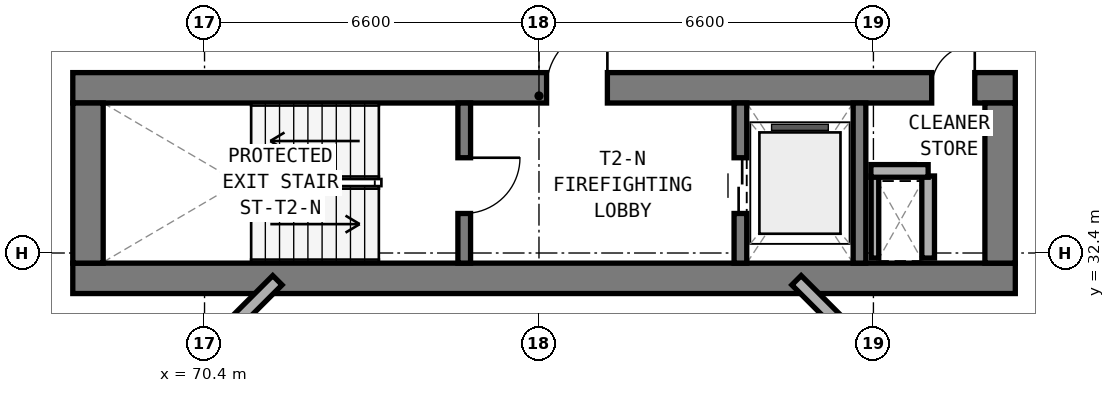
"""IFC4 building model, lengths in metres.
Left out: names, types, materials, properties, quantities, classifications, styles, units other than length and angle.
Written with IfcOpenShell. Run it as: python <this file> out.ifc"""

import sys

from ifc_helpers import new_model, si_unit, direction, frame, frame_2d, origin, place, context, subcontext, project, spatial, rectangle, extrude, element, fill, save


model = new_model("IFC4")
c1 = context("Model", 3, precision=1e-05, world=origin(), true_north=direction((0.0, 1.0)))
c2 = subcontext(c1, "Body", "Model", "MODEL_VIEW")
j1 = project(units=[si_unit("LENGTHUNIT", "METRE"), si_unit("PLANEANGLEUNIT", "RADIAN")], contexts=[c1])
p1 = place(None, origin())
s1 = spatial("IfcSite", under=j1, at=p1, CompositionType="ELEMENT")
p2 = place(p1, origin())
s2 = spatial("IfcBuilding", under=s1, at=p2, CompositionType="ELEMENT")
p3 = place(p2, frame((0.0, 0.0, 27.5)))
s3 = spatial("IfcBuildingStorey", under=s2, at=p3, CompositionType="ELEMENT", Elevation=27.5)
p4 = place(p3, frame((67.8, 31.9, 0.0), z_axis=(0.0, 0.0, 1.0), x_axis=(1.0, 0.0, 0.0)))
e1 = element("IfcWall", 1, at=p4, inside=s3, PredefinedType="SHEAR", context=c2, shape_type="SweptSolid", body=[
    extrude(rectangle(XDim=18.6, YDim=0.6, at=frame_2d((9.3, 0.0))), origin(), (0.0, 0.0, 1.0), 3.5),
])
p5 = place(p3, frame((67.8, 35.66, 0.0), z_axis=(0.0, 0.0, 1.0), x_axis=(1.0, 0.0, 0.0)))
e2 = element("IfcWall", 2, at=p5, inside=s3, PredefinedType="SHEAR", context=c2, shape_type="SweptSolid", body=[
    extrude(rectangle(XDim=18.6, YDim=0.6, at=frame_2d((9.3, 0.0))), origin(), (0.0, 0.0, 1.0), 3.5),
])
p6 = place(p5, frame((9.35, 0.0, 0.0)))
e3 = element("IfcOpeningElement", 3, at=p6, cuts=e2, PredefinedType="OPENING", context=c2, shape_type="SweptSolid", body=[
    extrude(rectangle(XDim=1.2, YDim=2.15, at=frame_2d((0.6, 1.075))), frame((0.0, 0.31, 0.0), z_axis=(0.0, -1.0, 0.0), x_axis=(1.0, 0.0, 0.0)), (0.0, 0.0, 1.0), 0.62),
])
p7 = place(p5, frame((16.95, 0.0, 0.0)))
e4 = element("IfcOpeningElement", 4, at=p7, cuts=e2, PredefinedType="OPENING", context=c2, shape_type="SweptSolid", body=[
    extrude(rectangle(XDim=0.85, YDim=2.1, at=frame_2d((0.425, 1.05))), frame((0.0, 0.31, 0.0), z_axis=(0.0, -1.0, 0.0), x_axis=(1.0, 0.0, 0.0)), (0.0, 0.0, 1.0), 0.62),
])
for number, where, z_axis, x_axis in (
    (5, (68.1, 32.2, 0.0), (0.0, 0.0, 1.0), (0.0, 1.0, 0.0)),
    (6, (86.1, 32.2, 0.0), (0.0, 0.0, 1.0), (0.0, 1.0, 0.0)),
):
    element("IfcWall", number, at=place(p3, frame(where, z_axis=z_axis, x_axis=x_axis)), inside=s3, PredefinedType="SHEAR", context=c2, shape_type="SweptSolid", body=[
        extrude(rectangle(XDim=3.16, YDim=0.6, at=frame_2d((1.58, 0.0))), origin(), (0.0, 0.0, 1.0), 3.5),
    ])
p8 = place(p3, frame((75.525, 32.2, 0.0), z_axis=(0.0, 0.0, 1.0), x_axis=(0.0, 1.0, 0.0)))
e7 = element("IfcWall", 7, at=p8, inside=s3, PredefinedType="STANDARD", context=c2, shape_type="SweptSolid", body=[
    extrude(rectangle(XDim=3.16, YDim=0.25, at=frame_2d((1.58, 0.0))), origin(), (0.0, 0.0, 1.0), 3.25),
])
p9 = place(p8, frame((0.98, 0.0, 0.0)))
e8 = element("IfcOpeningElement", 8, at=p9, cuts=e7, PredefinedType="OPENING", context=c2, shape_type="SweptSolid", body=[
    extrude(rectangle(XDim=1.1, YDim=2.15, at=frame_2d((0.55, 1.075))), frame((0.0, 0.135, 0.0), z_axis=(0.0, -1.0, 0.0), x_axis=(1.0, 0.0, 0.0)), (0.0, 0.0, 1.0), 0.27),
])
p10 = place(p3, frame((80.975, 32.2, 0.0), z_axis=(0.0, 0.0, 1.0), x_axis=(0.0, 1.0, 0.0)))
e9 = element("IfcWall", 9, at=p10, inside=s3, PredefinedType="STANDARD", context=c2, shape_type="SweptSolid", body=[
    extrude(rectangle(XDim=3.16, YDim=0.25, at=frame_2d((1.58, 0.0))), origin(), (0.0, 0.0, 1.0), 3.25),
])
p11 = place(p10, frame((0.98, 0.0, 0.0)))
e10 = element("IfcOpeningElement", 10, at=p11, cuts=e9, PredefinedType="OPENING", context=c2, shape_type="SweptSolid", body=[
    extrude(rectangle(XDim=1.1, YDim=2.15, at=frame_2d((0.55, 1.075))), frame((0.0, 0.135, 0.0), z_axis=(0.0, -1.0, 0.0), x_axis=(1.0, 0.0, 0.0)), (0.0, 0.0, 1.0), 0.27),
])
p12 = place(p3, frame((83.325, 32.2, 0.0), z_axis=(0.0, 0.0, 1.0), x_axis=(0.0, 1.0, 0.0)))
e11 = element("IfcWall", 11, at=p12, inside=s3, PredefinedType="STANDARD", context=c2, shape_type="SweptSolid", body=[
    extrude(rectangle(XDim=3.16, YDim=0.25, at=frame_2d((1.58, 0.0))), origin(), (0.0, 0.0, 1.0), 3.25),
])
for number, where, z_axis, x_axis in (
    (12, (83.716, 30.228, 0.0), (0.0, 0.0, 1.0), (-0.707, 0.707, 0.0)),
    (13, (71.838, 31.862, 0.0), (0.0, 0.0, 1.0), (-0.707, -0.707, 0.0)),
):
    element("IfcWall", number, at=place(p3, frame(where, z_axis=z_axis, x_axis=x_axis)), inside=s3, PredefinedType="STANDARD", context=c2, shape_type="SweptSolid", body=[
        extrude(rectangle(XDim=2.311, YDim=0.26, at=frame_2d((1.155, 0.0))), origin(), (0.0, 0.0, 1.0), 3.25),
    ])
p13 = place(p3, frame((83.63, 32.3, 0.0), z_axis=(0.0, 0.0, 1.0), x_axis=(0.0, 1.0, 0.0)))
e14 = element("IfcWall", 14, at=p13, inside=s3, PredefinedType="PARTITIONING", context=c2, shape_type="SweptSolid", body=[
    extrude(rectangle(XDim=1.62, YDim=0.15, at=frame_2d((0.81, 0.0))), origin(), (0.0, 0.0, 1.0), 2.725),
])
p14 = place(p3, frame((84.68, 32.3, 0.0), z_axis=(0.0, 0.0, 1.0), x_axis=(0.0, 1.0, 0.0)))
e15 = element("IfcWall", 15, at=p14, inside=s3, PredefinedType="SOLIDWALL", context=c2, shape_type="SweptSolid", body=[
    extrude(rectangle(XDim=1.62, YDim=0.25, at=frame_2d((0.81, 0.0))), origin(), (0.0, 0.0, 1.0), 3.22),
])
p15 = place(p3, frame((83.55, 34.02, 0.0), z_axis=(0.0, 0.0, 1.0), x_axis=(1.0, 0.0, 0.0)))
e16 = element("IfcWall", 16, at=p15, inside=s3, PredefinedType="SOLIDWALL", context=c2, shape_type="SweptSolid", body=[
    extrude(rectangle(XDim=1.13, YDim=0.25, at=frame_2d((0.565, 0.0))), origin(), (0.0, 0.0, 1.0), 3.22),
])
p16 = place(p9, frame((1.1, 0.0, 0.0), z_axis=(0.0, 0.0, 1.0), x_axis=(-1.0, 0.0, 0.0)))
e17 = element("IfcDoor", 17, at=p16, inside=s3, OperationType="SINGLE_SWING_LEFT", PredefinedType="DOOR", context=c2, shape_type="SweptSolid", body=[
    extrude(rectangle(XDim=1.1, YDim=2.15, at=frame_2d((0.55, 1.075))), frame((0.0, 0.025, 0.0), z_axis=(0.0, -1.0, 0.0), x_axis=(1.0, 0.0, 0.0)), (0.0, 0.0, 1.0), 0.05),
])
fill(e8, e17)
p17 = place(p6, origin())
e18 = element("IfcDoor", 18, at=p17, inside=s3, OperationType="SINGLE_SWING_RIGHT", PredefinedType="DOOR", context=c2, shape_type="SweptSolid", body=[
    extrude(rectangle(XDim=1.2, YDim=2.15, at=frame_2d((0.6, 1.075))), frame((0.0, 0.025, 0.0), z_axis=(0.0, -1.0, 0.0), x_axis=(1.0, 0.0, 0.0)), (0.0, 0.0, 1.0), 0.05),
])
fill(e3, e18)
p18 = place(p11, origin())
e19 = element("IfcDoor", 19, at=p18, inside=s3, OperationType="DOUBLE_DOOR_SLIDING", PredefinedType="DOOR", context=c2, shape_type="SweptSolid", body=[
    extrude(rectangle(XDim=1.1, YDim=2.15, at=frame_2d((0.55, 1.075))), frame((0.0, 0.025, 0.0), z_axis=(0.0, -1.0, 0.0), x_axis=(1.0, 0.0, 0.0)), (0.0, 0.0, 1.0), 0.05),
])
fill(e10, e19)
p19 = place(p7, origin())
e20 = element("IfcDoor", 20, at=p19, inside=s3, OperationType="SINGLE_SWING_RIGHT", PredefinedType="DOOR", context=c2, shape_type="SweptSolid", body=[
    extrude(rectangle(XDim=0.85, YDim=2.1, at=frame_2d((0.425, 1.05))), frame((0.0, 0.025, 0.0), z_axis=(0.0, -1.0, 0.0), x_axis=(1.0, 0.0, 0.0)), (0.0, 0.0, 1.0), 0.05),
])
fill(e4, e20)
save(model, sys.argv[1])
